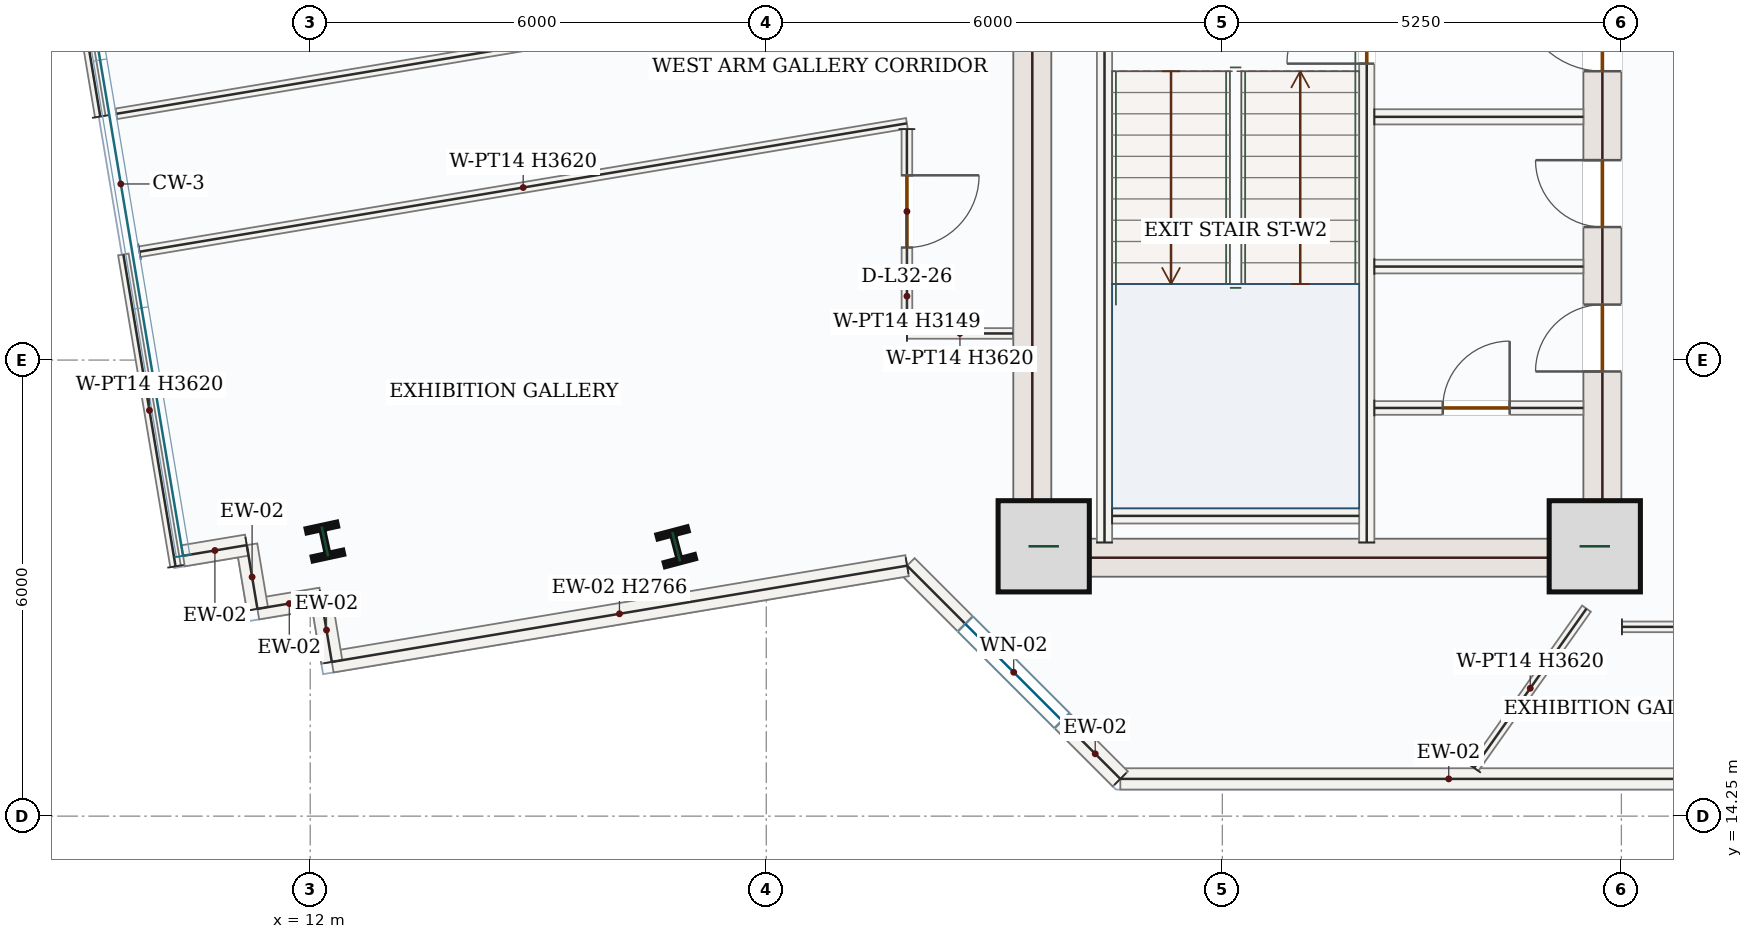
"""IFC4 building model, lengths in metres.
Left out: names, types, materials, properties, quantities, classifications, styles, units other than length and angle.
Written with IfcOpenShell. Run it as: python <this file> out.ifc"""

import sys

from ifc_helpers import new_model, si_unit, direction, frame, frame_2d, origin, origin_2d, place, context, subcontext, project, spatial, rectangle, i_section, extrude, source, transform, mapped, element, fill, save


model = new_model("IFC4")
c1 = context("Model", 3, precision=1e-05, world=origin(), true_north=direction((0.0, 1.0)))
c2 = subcontext(c1, "Body", "Model", "MODEL_VIEW")
j1 = project(units=[si_unit("LENGTHUNIT", "METRE"), si_unit("PLANEANGLEUNIT", "RADIAN")], contexts=[c1])
p1 = place(None, origin())
s1 = spatial("IfcSite", under=j1, at=p1, CompositionType="ELEMENT")
p2 = place(p1, origin())
s2 = spatial("IfcBuilding", under=s1, at=p2, CompositionType="ELEMENT")
p3 = place(p2, frame((0.0, 0.0, 143.4)))
s3 = spatial("IfcBuildingStorey", under=s2, at=p3, CompositionType="ELEMENT", Elevation=143.4)
m1 = source(origin(), c2, "Body", "SweptSolid", [
    extrude(rectangle(XDim=8.55, YDim=0.5, at=frame_2d((4.275, 0.0))), origin(), (0.0, 0.0, 1.0), 3.62),
])
p4 = place(p3, frame((21.5, 17.4, 0.0), z_axis=(0.0, 0.0, 1.0), x_axis=(0.0, 1.0, 0.0)))
e1 = element("IfcWall", 1, at=p4, inside=s3, PredefinedType="SHEAR", context=c2, shape_type="MappedRepresentation", body=[
    mapped(m1, transform((0.0, 0.0, 0.0), x_axis=(1.0, 0.0, 0.0), y_axis=(0.0, 1.0, 0.0), z_axis=(0.0, 0.0, 1.0), scale=1.0)),
])
p5 = place(p3, frame((29.0, 17.4, 0.0), z_axis=(0.0, 0.0, 1.0), x_axis=(0.0, 1.0, 0.0)))
e2 = element("IfcWall", 2, at=p5, inside=s3, PredefinedType="SHEAR", context=c2, shape_type="SweptSolid", body=[
    extrude(rectangle(XDim=8.55, YDim=0.5, at=frame_2d((4.275, 0.0))), origin(), (0.0, 0.0, 1.0), 3.62),
])
p6 = place(p5, frame((6.65, 0.0, 0.0)))
e3 = element("IfcOpeningElement", 3, at=p6, cuts=e2, PredefinedType="OPENING", context=c2, shape_type="SweptSolid", body=[
    extrude(rectangle(XDim=1.1, YDim=2.2, at=frame_2d((0.55, 1.1))), frame((0.0, 0.26, 0.0), z_axis=(0.0, -1.0, 0.0), x_axis=(1.0, 0.0, 0.0)), (0.0, 0.0, 1.0), 0.52),
])
p7 = place(p5, frame((2.7, 0.0, 0.0)))
e4 = element("IfcOpeningElement", 4, at=p7, cuts=e2, PredefinedType="OPENING", context=c2, shape_type="SweptSolid", body=[
    extrude(rectangle(XDim=0.88, YDim=2.1, at=frame_2d((0.44, 1.05))), frame((0.0, 0.26, 0.0), z_axis=(0.0, -1.0, 0.0), x_axis=(1.0, 0.0, 0.0)), (0.0, 0.0, 1.0), 0.52),
])
p8 = place(p5, frame((4.6, 0.0, 0.0)))
e5 = element("IfcOpeningElement", 5, at=p8, cuts=e2, PredefinedType="OPENING", context=c2, shape_type="SweptSolid", body=[
    extrude(rectangle(XDim=0.88, YDim=2.1, at=frame_2d((0.44, 1.05))), frame((0.0, 0.26, 0.0), z_axis=(0.0, -1.0, 0.0), x_axis=(1.0, 0.0, 0.0)), (0.0, 0.0, 1.0), 0.52),
])
m2 = source(origin(), c2, "Body", "SweptSolid", [
    extrude(rectangle(XDim=7.0, YDim=0.5, at=frame_2d((3.5, 0.0))), origin(), (0.0, 0.0, 1.0), 3.62),
])
p9 = place(p3, frame((21.75, 17.65, 0.0), z_axis=(0.0, 0.0, 1.0), x_axis=(1.0, 0.0, 0.0)))
e6 = element("IfcWall", 6, at=p9, inside=s3, PredefinedType="SHEAR", context=c2, shape_type="MappedRepresentation", body=[
    mapped(m2, transform((0.0, 0.0, 0.0), x_axis=(1.0, 0.0, 0.0), y_axis=(0.0, 1.0, 0.0), z_axis=(0.0, 0.0, 1.0), scale=1.0)),
])
m3 = source(origin(), c2, "Body", "SweptSolid", [
    extrude(rectangle(XDim=1.2, YDim=1.2, at=origin_2d()), origin(), (0.0, 0.0, 1.0), 3.9),
])
for number, where, z_axis, x_axis in (
    (7, (21.65, 17.8, 0.0), (0.0, 0.0, 1.0), (1.0, 0.0, 0.0)),
    (8, (28.9, 17.8, 0.0), (0.0, 0.0, 1.0), (1.0, 0.0, 0.0)),
):
    element("IfcColumn", number, at=place(p3, frame(where, z_axis=z_axis, x_axis=x_axis)), inside=s3, PredefinedType="COLUMN", context=c2, shape_type="MappedRepresentation", body=[
        mapped(m3, transform((0.0, 0.0, 0.0), x_axis=(1.0, 0.0, 0.0), y_axis=(0.0, 1.0, 0.0), z_axis=(0.0, 0.0, 1.0), scale=1.0)),
    ])
m4 = source(origin(), c2, "Body", "SweptSolid", [
    extrude(i_section(OverallWidth=0.412, OverallDepth=0.435, WebThickness=0.036, FlangeThickness=0.057, FilletRadius=0.018, at=origin_2d()), origin(), (0.0, 0.0, 1.0), 3.9),
])
for number, where, z_axis, x_axis in (
    (9, (16.815, 17.794, 0.0), (0.0, 0.0, 1.0), (0.967, 0.255, 0.0)),
    (10, (12.193, 17.863, 0.0), (0.0, 0.0, 1.0), (0.977, 0.211, 0.0)),
):
    element("IfcColumn", number, at=place(p3, frame(where, z_axis=z_axis, x_axis=x_axis)), inside=s3, PredefinedType="COLUMN", context=c2, shape_type="MappedRepresentation", body=[
        mapped(m4, transform((0.0, 0.0, 0.0), x_axis=(1.0, 0.0, 0.0), y_axis=(0.0, 1.0, 0.0), z_axis=(0.0, 0.0, 1.0), scale=1.0)),
    ])
m5 = source(origin(), c2, "Body", "SweptSolid", [
    extrude(rectangle(XDim=8.641, YDim=0.28, at=frame_2d((4.321, 0.0))), origin(), (0.0, 0.0, 1.0), 3.62),
])
p10 = place(p3, frame((31.299, 14.74, 0.0), z_axis=(0.0, 0.0, 1.0), x_axis=(-1.0, 0.0, 0.0)))
e11 = element("IfcWall", 11, at=p10, inside=s3, PredefinedType="SOLIDWALL", context=c2, shape_type="MappedRepresentation", body=[
    mapped(m5, transform((0.0, 0.0, 0.0), x_axis=(1.0, 0.0, 0.0), y_axis=(0.0, 1.0, 0.0), z_axis=(0.0, 0.0, 1.0), scale=1.0)),
])
p11 = place(p3, frame((22.658, 14.74, 0.0), z_axis=(0.0, 0.0, 1.0), x_axis=(-0.707076011326, 0.707137549708, 0.0)))
e12 = element("IfcWall", 12, at=p11, inside=s3, PredefinedType="SOLIDWALL", context=c2, shape_type="SweptSolid", body=[
    extrude(rectangle(XDim=3.967, YDim=0.28, at=frame_2d((1.984, 0.0))), origin(), (0.0, 0.0, 1.0), 3.62),
])
p12 = place(p11, frame((1.084, 0.0, 0.85)))
e13 = element("IfcOpeningElement", 13, at=p12, cuts=e12, PredefinedType="OPENING", context=c2, shape_type="SweptSolid", body=[
    extrude(rectangle(XDim=1.8, YDim=1.75, at=frame_2d((0.9, 0.875))), frame((0.0, 0.15, 0.0), z_axis=(0.0, -1.0, 0.0), x_axis=(1.0, 0.0, 0.0)), (0.0, 0.0, 1.0), 0.3),
])
m6 = source(origin(), c2, "Body", "SweptSolid", [
    extrude(rectangle(XDim=7.674, YDim=0.28, at=frame_2d((3.837, 0.0))), origin(), (0.0, 0.0, 1.0), 2.766),
])
p13 = place(p3, frame((19.853, 17.545, 0.0), z_axis=(0.0, 0.0, 1.0), x_axis=(-0.986284504747, -0.165054159886, 0.0)))
e14 = element("IfcWall", 14, at=p13, inside=s3, PredefinedType="SOLIDWALL", context=c2, shape_type="MappedRepresentation", body=[
    mapped(m6, transform((0.0, 0.0, 0.0), x_axis=(1.0, 0.0, 0.0), y_axis=(0.0, 1.0, 0.0), z_axis=(0.0, 0.0, 1.0), scale=1.0)),
])
m7 = source(origin(), c2, "Body", "SweptSolid", [
    extrude(rectangle(XDim=0.85, YDim=0.28, at=frame_2d((0.425, 0.0))), origin(), (0.0, 0.0, 1.0), 3.62),
])
for number, where, z_axis, x_axis in (
    (15, (12.284, 16.279, 0.0), (0.0, 0.0, 1.0), (-0.165, 0.986, 0.0)),
    (16, (12.144, 17.117, 0.0), (0.0, 0.0, 1.0), (-0.986, -0.165, 0.0)),
    (17, (11.306, 16.977, 0.0), (0.0, 0.0, 1.0), (-0.165, 0.986, 0.0)),
    (18, (11.165, 17.815, 0.0), (0.0, 0.0, 1.0), (-0.986, -0.165, 0.0)),
):
    element("IfcWall", number, at=place(p3, frame(where, z_axis=z_axis, x_axis=x_axis)), inside=s3, PredefinedType="SOLIDWALL", context=c2, shape_type="MappedRepresentation", body=[
        mapped(m7, transform((0.0, 0.0, 0.0), x_axis=(1.0, 0.0, 0.0), y_axis=(0.0, 1.0, 0.0), z_axis=(0.0, 0.0, 1.0), scale=1.0)),
    ])
m8 = source(origin(), c2, "Body", "SweptSolid", [
    extrude(rectangle(XDim=7.87, YDim=0.2, at=frame_2d((3.935, 0.0))), origin(), (0.0, 0.0, 1.0), 3.62),
])
p14 = place(p3, frame((22.45, 17.85, 0.0), z_axis=(0.0, 0.0, 1.0), x_axis=(0.0, 1.0, 0.0)))
e19 = element("IfcWall", 19, at=p14, inside=s3, PredefinedType="SOLIDWALL", context=c2, shape_type="MappedRepresentation", body=[
    mapped(m8, transform((0.0, 0.0, 0.0), x_axis=(1.0, 0.0, 0.0), y_axis=(0.0, 1.0, 0.0), z_axis=(0.0, 0.0, 1.0), scale=1.0)),
])
p15 = place(p3, frame((25.9, 17.85, 0.0), z_axis=(0.0, 0.0, 1.0), x_axis=(0.0, 1.0, 0.0)))
e20 = element("IfcWall", 20, at=p15, inside=s3, PredefinedType="SOLIDWALL", context=c2, shape_type="SweptSolid", body=[
    extrude(rectangle(XDim=8.0, YDim=0.2, at=frame_2d((4.0, 0.0))), origin(), (0.0, 0.0, 1.0), 3.62),
])
p16 = place(p15, frame((6.3, 0.0, 0.0)))
e21 = element("IfcOpeningElement", 21, at=p16, cuts=e20, PredefinedType="OPENING", context=c2, shape_type="SweptSolid", body=[
    extrude(rectangle(XDim=1.05, YDim=2.15, at=frame_2d((0.525, 1.075))), frame((0.0, 0.11, 0.0), z_axis=(0.0, -1.0, 0.0), x_axis=(1.0, 0.0, 0.0)), (0.0, 0.0, 1.0), 0.22),
])
m9 = source(origin(), c2, "Body", "SweptSolid", [
    extrude(rectangle(XDim=3.25, YDim=0.2, at=frame_2d((1.625, 0.0))), origin(), (0.0, 0.0, 1.0), 3.62),
])
p17 = place(p3, frame((22.55, 18.2, 0.0), z_axis=(0.0, 0.0, 1.0), x_axis=(1.0, 0.0, 0.0)))
e22 = element("IfcWall", 22, at=p17, inside=s3, PredefinedType="SOLIDWALL", context=c2, shape_type="MappedRepresentation", body=[
    mapped(m9, transform((0.0, 0.0, 0.0), x_axis=(1.0, 0.0, 0.0), y_axis=(0.0, 1.0, 0.0), z_axis=(0.0, 0.0, 1.0), scale=1.0)),
])
m10 = source(origin(), c2, "Body", "SweptSolid", [
    extrude(rectangle(XDim=2.75, YDim=0.2, at=frame_2d((1.375, 0.0))), origin(), (0.0, 0.0, 1.0), 3.62),
])
p18 = place(p3, frame((26.0, 23.45, 0.0), z_axis=(0.0, 0.0, 1.0), x_axis=(1.0, 0.0, 0.0)))
e23 = element("IfcWall", 23, at=p18, inside=s3, PredefinedType="SOLIDWALL", context=c2, shape_type="MappedRepresentation", body=[
    mapped(m10, transform((0.0, 0.0, 0.0), x_axis=(1.0, 0.0, 0.0), y_axis=(0.0, 1.0, 0.0), z_axis=(0.0, 0.0, 1.0), scale=1.0)),
])
p19 = place(p3, frame((26.0, 19.62, 0.0), z_axis=(0.0, 0.0, 1.0), x_axis=(1.0, 0.0, 0.0)))
e24 = element("IfcWall", 24, at=p19, inside=s3, PredefinedType="PARTITIONING", context=c2, shape_type="SweptSolid", body=[
    extrude(rectangle(XDim=2.75, YDim=0.18, at=frame_2d((1.375, 0.0))), origin(), (0.0, 0.0, 1.0), 3.62),
])
p20 = place(p19, frame((0.9, 0.0, 0.0)))
e25 = element("IfcOpeningElement", 25, at=p20, cuts=e24, PredefinedType="OPENING", context=c2, shape_type="SweptSolid", body=[
    extrude(rectangle(XDim=0.88, YDim=2.1, at=frame_2d((0.44, 1.05))), frame((0.0, 0.1, 0.0), z_axis=(0.0, -1.0, 0.0), x_axis=(1.0, 0.0, 0.0)), (0.0, 0.0, 1.0), 0.2),
])
m11 = source(origin(), c2, "Body", "SweptSolid", [
    extrude(rectangle(XDim=2.75, YDim=0.18, at=frame_2d((1.375, 0.0))), origin(), (0.0, 0.0, 1.0), 3.62),
])
p21 = place(p3, frame((26.0, 21.48, 0.0), z_axis=(0.0, 0.0, 1.0), x_axis=(1.0, 0.0, 0.0)))
e26 = element("IfcWall", 26, at=p21, inside=s3, PredefinedType="PARTITIONING", context=c2, shape_type="MappedRepresentation", body=[
    mapped(m11, transform((0.0, 0.0, 0.0), x_axis=(1.0, 0.0, 0.0), y_axis=(0.0, 1.0, 0.0), z_axis=(0.0, 0.0, 1.0), scale=1.0)),
])
p22 = place(p3, frame((29.258, 16.74, 0.0), z_axis=(0.0, 0.0, 1.0), x_axis=(0.999999999474, -3.2436991e-05, 0.0)))
e27 = element("IfcWall", 27, at=p22, inside=s3, PredefinedType="PARTITIONING", context=c2, shape_type="SweptSolid", body=[
    extrude(rectangle(XDim=7.527, YDim=0.14, at=frame_2d((3.763, 0.0))), origin(), (0.0, 0.0, 1.0), 3.62),
])
p23 = place(p22, frame((5.13, 0.0, 0.0)))
e28 = element("IfcOpeningElement", 28, at=p23, cuts=e27, PredefinedType="OPENING", context=c2, shape_type="SweptSolid", body=[
    extrude(rectangle(XDim=0.95, YDim=2.15, at=frame_2d((0.475, 1.075))), frame((0.0, 0.08, 0.0), z_axis=(0.0, -1.0, 0.0), x_axis=(1.0, 0.0, 0.0)), (0.0, 0.0, 1.0), 0.16),
])
m12 = source(origin(), c2, "Body", "SweptSolid", [
    extrude(rectangle(XDim=2.565, YDim=0.14, at=frame_2d((1.282, 0.0))), origin(), (0.0, 0.0, 1.0), 3.62),
])
p24 = place(p3, frame((27.311, 14.885, 0.0), z_axis=(0.0, 0.0, 1.0), x_axis=(0.576926084836, 0.816796359343, 0.0)))
e29 = element("IfcWall", 29, at=p24, inside=s3, PredefinedType="PARTITIONING", context=c2, shape_type="MappedRepresentation", body=[
    mapped(m12, transform((0.0, 0.0, 0.0), x_axis=(1.0, 0.0, 0.0), y_axis=(0.0, 1.0, 0.0), z_axis=(0.0, 0.0, 1.0), scale=1.0)),
])
m13 = source(origin(), c2, "Body", "SweptSolid", [
    extrude(rectangle(XDim=10.544, YDim=0.14, at=frame_2d((5.272, 0.0))), origin(), (0.0, 0.0, 1.0), 3.62),
])
p25 = place(p3, frame((19.85, 25.23, 0.0), z_axis=(0.0, 0.0, 1.0), x_axis=(-0.986287336963, -0.165037235031, 0.0)))
e30 = element("IfcWall", 30, at=p25, inside=s3, PredefinedType="PARTITIONING", context=c2, shape_type="MappedRepresentation", body=[
    mapped(m13, transform((0.0, 0.0, 0.0), x_axis=(1.0, 0.0, 0.0), y_axis=(0.0, 1.0, 0.0), z_axis=(0.0, 0.0, 1.0), scale=1.0)),
])
m14 = source(origin(), c2, "Body", "SweptSolid", [
    extrude(rectangle(XDim=4.16, YDim=0.14, at=frame_2d((2.08, 0.0))), origin(), (0.0, 0.0, 1.0), 3.62),
])
for number, where, z_axis, x_axis in (
    (31, (9.238, 23.454, 0.0), (0.0, 0.0, 1.0), (-0.165, 0.986, 0.0)),
    (32, (10.229, 17.537, 0.0), (0.0, 0.0, 1.0), (-0.165, 0.986, 0.0)),
):
    element("IfcWall", number, at=place(p3, frame(where, z_axis=z_axis, x_axis=x_axis)), inside=s3, PredefinedType="PARTITIONING", context=c2, shape_type="MappedRepresentation", body=[
        mapped(m14, transform((0.0, 0.0, 0.0), x_axis=(1.0, 0.0, 0.0), y_axis=(0.0, 1.0, 0.0), z_axis=(0.0, 0.0, 1.0), scale=1.0)),
    ])
m15 = source(origin(), c2, "Body", "SweptSolid", [
    extrude(rectangle(XDim=10.237, YDim=0.14, at=frame_2d((5.118, 0.0))), origin(), (0.0, 0.0, 1.0), 3.62),
])
p26 = place(p3, frame((9.754, 21.675, 0.0), z_axis=(0.0, 0.0, 1.0), x_axis=(0.986290594835, 0.165017764319, 0.0)))
e33 = element("IfcWall", 33, at=p26, inside=s3, PredefinedType="PARTITIONING", context=c2, shape_type="MappedRepresentation", body=[
    mapped(m15, transform((0.0, 0.0, 0.0), x_axis=(1.0, 0.0, 0.0), y_axis=(0.0, 1.0, 0.0), z_axis=(0.0, 0.0, 1.0), scale=1.0)),
])
p27 = place(p3, frame((19.85, 23.289, 0.0), z_axis=(0.0, 0.0, 1.0), x_axis=(0.000363372069, -0.99999993398, 0.0)))
e34 = element("IfcWall", 34, at=p27, inside=s3, PredefinedType="PARTITIONING", context=c2, shape_type="SweptSolid", body=[
    extrude(rectangle(XDim=2.688, YDim=0.14, at=frame_2d((1.344, 0.0))), origin(), (0.0, 0.0, 1.0), 3.149),
])
p28 = place(p27, frame((0.608, 0.0, 0.0)))
e35 = element("IfcOpeningElement", 35, at=p28, cuts=e34, PredefinedType="OPENING", context=c2, shape_type="SweptSolid", body=[
    extrude(rectangle(XDim=0.95, YDim=2.15, at=frame_2d((0.475, 1.075))), frame((0.0, 0.08, 0.0), z_axis=(0.0, -1.0, 0.0), x_axis=(1.0, 0.0, 0.0)), (0.0, 0.0, 1.0), 0.16),
])
m16 = source(origin(), c2, "Body", "SweptSolid", [
    extrude(rectangle(XDim=1.394, YDim=0.14, at=frame_2d((0.697, 0.0))), origin(), (0.0, 0.0, 1.0), 3.62),
])
p29 = place(p3, frame((19.851, 20.601, 0.0), z_axis=(0.0, 0.0, 1.0), x_axis=(0.999999754632, -0.000700525222, 0.0)))
e36 = element("IfcWall", 36, at=p29, inside=s3, PredefinedType="PARTITIONING", context=c2, shape_type="MappedRepresentation", body=[
    mapped(m16, transform((0.0, 0.0, 0.0), x_axis=(1.0, 0.0, 0.0), y_axis=(0.0, 1.0, 0.0), z_axis=(0.0, 0.0, 1.0), scale=1.0)),
])
m17 = source(origin(), c2, "Body", "SweptSolid", [
    extrude(rectangle(XDim=1.8, YDim=1.75, at=frame_2d((0.9, 0.875))), frame((0.0, 0.03, 0.0), z_axis=(0.0, -1.0, 0.0), x_axis=(1.0, 0.0, 0.0)), (0.0, 0.0, 1.0), 0.06),
])
p30 = place(p12, origin())
e37 = element("IfcWindow", 37, at=p30, inside=s3, PartitioningType="DOUBLE_PANEL_VERTICAL", PredefinedType="WINDOW", context=c2, shape_type="MappedRepresentation", body=[
    mapped(m17, transform((0.0, 0.0, 0.0), x_axis=(1.0, 0.0, 0.0), y_axis=(0.0, 1.0, 0.0), z_axis=(0.0, 0.0, 1.0), scale=1.0)),
])
fill(e13, e37)
m18 = source(origin(), c2, "Body", "SweptSolid", [
    extrude(rectangle(XDim=1.05, YDim=2.15, at=frame_2d((0.525, 1.075))), frame((0.0, 0.025, 0.0), z_axis=(0.0, -1.0, 0.0), x_axis=(1.0, 0.0, 0.0)), (0.0, 0.0, 1.0), 0.05),
])
p31 = place(p16, origin())
e38 = element("IfcDoor", 38, at=p31, inside=s3, OperationType="SINGLE_SWING_LEFT", PredefinedType="DOOR", context=c2, shape_type="MappedRepresentation", body=[
    mapped(m18, transform((0.0, 0.0, 0.0), x_axis=(1.0, 0.0, 0.0), y_axis=(0.0, 1.0, 0.0), z_axis=(0.0, 0.0, 1.0), scale=1.0)),
])
fill(e21, e38)
m19 = source(origin(), c2, "Body", "SweptSolid", [
    extrude(rectangle(XDim=1.1, YDim=2.2, at=frame_2d((0.55, 1.1))), frame((0.0, 0.025, 0.0), z_axis=(0.0, -1.0, 0.0), x_axis=(1.0, 0.0, 0.0)), (0.0, 0.0, 1.0), 0.05),
])
p32 = place(p6, origin())
e39 = element("IfcDoor", 39, at=p32, inside=s3, OperationType="SINGLE_SWING_RIGHT", PredefinedType="DOOR", context=c2, shape_type="MappedRepresentation", body=[
    mapped(m19, transform((0.0, 0.0, 0.0), x_axis=(1.0, 0.0, 0.0), y_axis=(0.0, 1.0, 0.0), z_axis=(0.0, 0.0, 1.0), scale=1.0)),
])
fill(e3, e39)
m20 = source(origin(), c2, "Body", "SweptSolid", [
    extrude(rectangle(XDim=0.88, YDim=2.1, at=frame_2d((0.44, 1.05))), frame((0.0, 0.025, 0.0), z_axis=(0.0, -1.0, 0.0), x_axis=(1.0, 0.0, 0.0)), (0.0, 0.0, 1.0), 0.05),
])
p33 = place(p20, origin())
e40 = element("IfcDoor", 40, at=p33, inside=s3, OperationType="SINGLE_SWING_RIGHT", PredefinedType="DOOR", context=c2, shape_type="MappedRepresentation", body=[
    mapped(m20, transform((0.0, 0.0, 0.0), x_axis=(1.0, 0.0, 0.0), y_axis=(0.0, 1.0, 0.0), z_axis=(0.0, 0.0, 1.0), scale=1.0)),
])
fill(e25, e40)
p34 = place(p7, origin())
e41 = element("IfcDoor", 41, at=p34, inside=s3, OperationType="SINGLE_SWING_LEFT", PredefinedType="DOOR", context=c2, shape_type="MappedRepresentation", body=[
    mapped(m20, transform((0.0, 0.0, 0.0), x_axis=(1.0, 0.0, 0.0), y_axis=(0.0, 1.0, 0.0), z_axis=(0.0, 0.0, 1.0), scale=1.0)),
])
fill(e4, e41)
p35 = place(p8, origin())
e42 = element("IfcDoor", 42, at=p35, inside=s3, OperationType="SINGLE_SWING_RIGHT", PredefinedType="DOOR", context=c2, shape_type="MappedRepresentation", body=[
    mapped(m20, transform((0.0, 0.0, 0.0), x_axis=(1.0, 0.0, 0.0), y_axis=(0.0, 1.0, 0.0), z_axis=(0.0, 0.0, 1.0), scale=1.0)),
])
fill(e5, e42)
m21 = source(origin(), c2, "Body", "SweptSolid", [
    extrude(rectangle(XDim=0.95, YDim=2.15, at=frame_2d((0.475, 1.075))), frame((0.0, 0.025, 0.0), z_axis=(0.0, -1.0, 0.0), x_axis=(1.0, 0.0, 0.0)), (0.0, 0.0, 1.0), 0.05),
])
p36 = place(p28, origin())
e43 = element("IfcDoor", 43, at=p36, inside=s3, OperationType="SINGLE_SWING_LEFT", PredefinedType="DOOR", context=c2, shape_type="MappedRepresentation", body=[
    mapped(m21, transform((0.0, 0.0, 0.0), x_axis=(1.0, 0.0, 0.0), y_axis=(0.0, 1.0, 0.0), z_axis=(0.0, 0.0, 1.0), scale=1.0)),
])
fill(e35, e43)
save(model, sys.argv[1])
